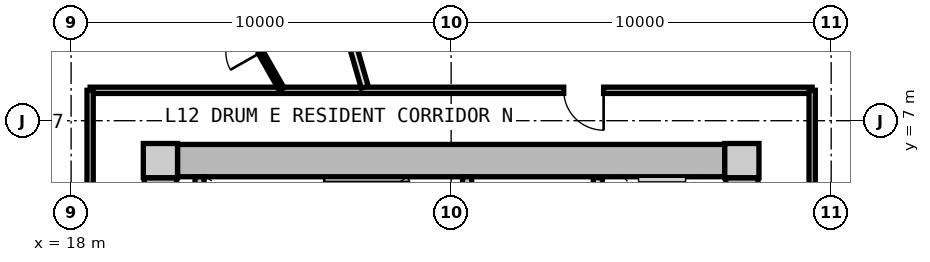
"""IFC4 building model, lengths in metres.
Left out: names, types, materials, properties, quantities, classifications, styles, units other than length and angle.
Written with IfcOpenShell. Run it as: python <this file> out.ifc"""

import sys

from ifc_helpers import new_model, si_unit, direction, frame, frame_2d, origin, origin_2d, place, context, subcontext, project, spatial, rectangle, extrude, source, transform, mapped, element, fill, save


model = new_model("IFC4")
c1 = context("Model", 3, precision=1e-05, world=origin(), true_north=direction((0.0, 1.0)))
c2 = subcontext(c1, "Body", "Model", "MODEL_VIEW")
j1 = project(units=[si_unit("LENGTHUNIT", "METRE"), si_unit("PLANEANGLEUNIT", "RADIAN")], contexts=[c1])
p1 = place(None, origin())
s1 = spatial("IfcSite", under=j1, at=p1, CompositionType="ELEMENT")
p2 = place(p1, origin())
s2 = spatial("IfcBuilding", under=s1, at=p2, CompositionType="ELEMENT")
p3 = place(p2, frame((0.0, 0.0, 42.95)))
s3 = spatial("IfcBuildingStorey", under=s2, at=p3, CompositionType="ELEMENT", Elevation=42.95)
m1 = source(origin(), c2, "Body", "SweptSolid", [
    extrude(rectangle(XDim=0.9, YDim=0.9, at=origin_2d()), origin(), (0.0, 0.0, 1.0), 3.05),
])
for number, where, z_axis, x_axis in (
    (1, (35.65, 5.95, 0.0), (0.0, 0.0, 1.0), (1.0, 0.0, 0.0)),
    (2, (20.35, 5.95, 0.0), (0.0, 0.0, 1.0), (1.0, 0.0, 0.0)),
):
    element("IfcColumn", number, at=place(p3, frame(where, z_axis=z_axis, x_axis=x_axis)), inside=s3, PredefinedType="COLUMN", context=c2, shape_type="MappedRepresentation", body=[
        mapped(m1, transform((0.0, 0.0, 0.0), x_axis=(1.0, 0.0, 0.0), y_axis=(0.0, 1.0, 0.0), z_axis=(0.0, 0.0, 1.0), scale=1.0)),
    ])
m2 = source(origin(), c2, "Body", "SweptSolid", [
    extrude(rectangle(XDim=14.4, YDim=0.85, at=frame_2d((7.2, 0.0))), origin(), (0.0, 0.0, 1.0), 2.79),
])
p4 = place(p3, frame((20.8, 5.95, 0.0), z_axis=(0.0, 0.0, 1.0), x_axis=(1.0, 0.0, 0.0)))
e3 = element("IfcWall", 3, at=p4, inside=s3, PredefinedType="SHEAR", context=c2, shape_type="MappedRepresentation", body=[
    mapped(m2, transform((0.0, 0.0, 0.0), x_axis=(1.0, 0.0, 0.0), y_axis=(0.0, 1.0, 0.0), z_axis=(0.0, 0.0, 1.0), scale=1.0)),
])
m3 = source(origin(), c2, "Body", "SweptSolid", [
    extrude(rectangle(XDim=11.0, YDim=0.85, at=frame_2d((5.5, 0.0))), origin(), (0.0, 0.0, 1.0), 2.79),
])
p5 = place(p3, frame((20.35, -5.5, 0.0), z_axis=(0.0, 0.0, 1.0), x_axis=(0.0, 1.0, 0.0)))
e4 = element("IfcWall", 4, at=p5, inside=s3, PredefinedType="SHEAR", context=c2, shape_type="MappedRepresentation", body=[
    mapped(m3, transform((0.0, 0.0, 0.0), x_axis=(1.0, 0.0, 0.0), y_axis=(0.0, 1.0, 0.0), z_axis=(0.0, 0.0, 1.0), scale=1.0)),
])
p6 = place(p5, frame((3.8, 0.0, 0.0)))
e5 = element("IfcOpeningElement", 5, at=p6, cuts=e4, PredefinedType="OPENING", context=c2, shape_type="SweptSolid", body=[
    extrude(rectangle(XDim=1.2, YDim=2.15, at=frame_2d((0.6, 1.075))), frame((0.0, 0.435, 0.0), z_axis=(0.0, -1.0, 0.0), x_axis=(1.0, 0.0, 0.0)), (0.0, 0.0, 1.0), 0.87),
])
p7 = place(p3, frame((35.65, 5.5, 0.0), z_axis=(0.0, 0.0, 1.0), x_axis=(0.0, -1.0, 0.0)))
e6 = element("IfcWall", 6, at=p7, inside=s3, PredefinedType="SHEAR", context=c2, shape_type="MappedRepresentation", body=[
    mapped(m3, transform((0.0, 0.0, 0.0), x_axis=(1.0, 0.0, 0.0), y_axis=(0.0, 1.0, 0.0), z_axis=(0.0, 0.0, 1.0), scale=1.0)),
])
p8 = place(p7, frame((5.65, 0.0, 0.0)))
e7 = element("IfcOpeningElement", 7, at=p8, cuts=e6, PredefinedType="OPENING", context=c2, shape_type="SweptSolid", body=[
    extrude(rectangle(XDim=1.2, YDim=2.15, at=frame_2d((0.6, 1.075))), frame((0.0, 0.435, 0.0), z_axis=(0.0, -1.0, 0.0), x_axis=(1.0, 0.0, 0.0)), (0.0, 0.0, 1.0), 0.87),
])
m4 = source(origin(), c2, "Body", "SweptSolid", [
    extrude(rectangle(XDim=3.075, YDim=0.24, at=frame_2d((1.538, 0.0))), origin(), (0.0, 0.0, 1.0), 2.79),
])
p9 = place(p3, frame((21.38, 2.45, 0.0), z_axis=(0.0, 0.0, 1.0), x_axis=(0.0, 1.0, 0.0)))
e8 = element("IfcWall", 8, at=p9, inside=s3, PredefinedType="PARTITIONING", context=c2, shape_type="MappedRepresentation", body=[
    mapped(m4, transform((0.0, 0.0, 0.0), x_axis=(1.0, 0.0, 0.0), y_axis=(0.0, 1.0, 0.0), z_axis=(0.0, 0.0, 1.0), scale=1.0)),
])
p10 = place(p3, frame((28.42, 2.45, 0.0), z_axis=(0.0, 0.0, 1.0), x_axis=(0.0, 1.0, 0.0)))
e9 = element("IfcWall", 9, at=p10, inside=s3, PredefinedType="PARTITIONING", context=c2, shape_type="MappedRepresentation", body=[
    mapped(m4, transform((0.0, 0.0, 0.0), x_axis=(1.0, 0.0, 0.0), y_axis=(0.0, 1.0, 0.0), z_axis=(0.0, 0.0, 1.0), scale=1.0)),
])
p11 = place(p10, frame((0.55, 0.0, 0.0)))
e10 = element("IfcOpeningElement", 10, at=p11, cuts=e9, PredefinedType="OPENING", context=c2, shape_type="SweptSolid", body=[
    extrude(rectangle(XDim=1.1, YDim=2.15, at=frame_2d((0.55, 1.075))), frame((0.0, 0.13, 0.0), z_axis=(0.0, -1.0, 0.0), x_axis=(1.0, 0.0, 0.0)), (0.0, 0.0, 1.0), 0.26),
])
m5 = source(origin(), c2, "Body", "SweptSolid", [
    extrude(rectangle(XDim=5.0, YDim=0.24, at=frame_2d((2.5, 0.0))), origin(), (0.0, 0.0, 1.0), 2.775),
])
p12 = place(p3, frame((31.86, 0.5, 0.0), z_axis=(0.0, 0.0, 1.0), x_axis=(0.0, 1.0, 0.0)))
e11 = element("IfcWall", 11, at=p12, inside=s3, PredefinedType="PARTITIONING", context=c2, shape_type="MappedRepresentation", body=[
    mapped(m5, transform((0.0, 0.0, 0.0), x_axis=(1.0, 0.0, 0.0), y_axis=(0.0, 1.0, 0.0), z_axis=(0.0, 0.0, 1.0), scale=1.0)),
])
p13 = place(p12, frame((3.05, 0.0, 0.0)))
e12 = element("IfcOpeningElement", 12, at=p13, cuts=e11, PredefinedType="OPENING", context=c2, shape_type="SweptSolid", body=[
    extrude(rectangle(XDim=1.3, YDim=2.2, at=frame_2d((0.65, 1.1))), frame((0.0, 0.13, 0.0), z_axis=(0.0, -1.0, 0.0), x_axis=(1.0, 0.0, 0.0)), (0.0, 0.0, 1.0), 0.26),
])
p14 = place(p12, frame((0.55, 0.0, 0.0)))
e13 = element("IfcOpeningElement", 13, at=p14, cuts=e11, PredefinedType="OPENING", context=c2, shape_type="SweptSolid", body=[
    extrude(rectangle(XDim=1.3, YDim=2.2, at=frame_2d((0.65, 1.1))), frame((0.0, 0.13, 0.0), z_axis=(0.0, -1.0, 0.0), x_axis=(1.0, 0.0, 0.0)), (0.0, 0.0, 1.0), 0.26),
])
m6 = source(origin(), c2, "Body", "SweptSolid", [
    extrude(rectangle(XDim=19.0, YDim=0.165, at=frame_2d((9.5, 0.0))), origin(), (0.0, 0.0, 1.0), 2.775),
])
p15 = place(p3, frame((18.5, 7.8, 0.0), z_axis=(0.0, 0.0, 1.0), x_axis=(1.0, 0.0, 0.0)))
e14 = element("IfcWall", 14, at=p15, inside=s3, PredefinedType="PARTITIONING", context=c2, shape_type="MappedRepresentation", body=[
    mapped(m6, transform((0.0, 0.0, 0.0), x_axis=(1.0, 0.0, 0.0), y_axis=(0.0, 1.0, 0.0), z_axis=(0.0, 0.0, 1.0), scale=1.0)),
])
p16 = place(p15, frame((12.462, 0.0, 0.0)))
e15 = element("IfcOpeningElement", 15, at=p16, cuts=e14, PredefinedType="OPENING", context=c2, shape_type="SweptSolid", body=[
    extrude(rectangle(XDim=1.05, YDim=2.15, at=frame_2d((0.525, 1.075))), frame((0.0, 0.093, 0.0), z_axis=(0.0, -1.0, 0.0), x_axis=(1.0, 0.0, 0.0)), (0.0, 0.0, 1.0), 0.185),
])
m7 = source(origin(), c2, "Body", "SweptSolid", [
    extrude(rectangle(XDim=15.6, YDim=0.165, at=frame_2d((7.8, 0.0))), origin(), (0.0, 0.0, 1.0), 2.775),
])
p17 = place(p3, frame((18.5, -7.8, 0.0), z_axis=(0.0, 0.0, 1.0), x_axis=(0.0, 1.0, 0.0)))
e16 = element("IfcWall", 16, at=p17, inside=s3, PredefinedType="PARTITIONING", context=c2, shape_type="MappedRepresentation", body=[
    mapped(m7, transform((0.0, 0.0, 0.0), x_axis=(1.0, 0.0, 0.0), y_axis=(0.0, 1.0, 0.0), z_axis=(0.0, 0.0, 1.0), scale=1.0)),
])
p18 = place(p17, frame((7.275, 0.0, 0.0)))
e17 = element("IfcOpeningElement", 17, at=p18, cuts=e16, PredefinedType="OPENING", context=c2, shape_type="SweptSolid", body=[
    extrude(rectangle(XDim=1.05, YDim=2.15, at=frame_2d((0.525, 1.075))), frame((0.0, 0.093, 0.0), z_axis=(0.0, -1.0, 0.0), x_axis=(1.0, 0.0, 0.0)), (0.0, 0.0, 1.0), 0.185),
])
p19 = place(p3, frame((37.5, 7.8, 0.0), z_axis=(0.0, 0.0, 1.0), x_axis=(0.0, -1.0, 0.0)))
e18 = element("IfcWall", 18, at=p19, inside=s3, PredefinedType="PARTITIONING", context=c2, shape_type="MappedRepresentation", body=[
    mapped(m7, transform((0.0, 0.0, 0.0), x_axis=(1.0, 0.0, 0.0), y_axis=(0.0, 1.0, 0.0), z_axis=(0.0, 0.0, 1.0), scale=1.0)),
])
p20 = place(p19, frame((14.215, 0.0, 0.0)))
e19 = element("IfcOpeningElement", 19, at=p20, cuts=e18, PredefinedType="OPENING", context=c2, shape_type="SweptSolid", body=[
    extrude(rectangle(XDim=0.92, YDim=2.1, at=frame_2d((0.46, 1.05))), frame((0.0, 0.093, 0.0), z_axis=(0.0, -1.0, 0.0), x_axis=(1.0, 0.0, 0.0)), (0.0, 0.0, 1.0), 0.185),
])
p21 = place(p19, frame((11.609, 0.0, 0.0)))
e20 = element("IfcOpeningElement", 20, at=p21, cuts=e18, PredefinedType="OPENING", context=c2, shape_type="SweptSolid", body=[
    extrude(rectangle(XDim=0.92, YDim=2.1, at=frame_2d((0.46, 1.05))), frame((0.0, 0.093, 0.0), z_axis=(0.0, -1.0, 0.0), x_axis=(1.0, 0.0, 0.0)), (0.0, 0.0, 1.0), 0.185),
])
p22 = place(p19, frame((7.175, 0.0, 0.0)))
e21 = element("IfcOpeningElement", 21, at=p22, cuts=e18, PredefinedType="OPENING", context=c2, shape_type="SweptSolid", body=[
    extrude(rectangle(XDim=1.25, YDim=2.2, at=frame_2d((0.625, 1.1))), frame((0.0, 0.093, 0.0), z_axis=(0.0, -1.0, 0.0), x_axis=(1.0, 0.0, 0.0)), (0.0, 0.0, 1.0), 0.185),
])
m8 = source(origin(), c2, "Body", "SweptSolid", [
    extrude(rectangle(XDim=10.196, YDim=0.19, at=frame_2d((5.098, 0.0))), origin(), (0.0, 0.0, 1.0), 2.225),
])
p23 = place(p3, frame((25.727, 7.88, 0.0), z_axis=(0.0, 0.0, 1.0), x_axis=(-0.277136420347, 0.960830580549, 0.0)))
e22 = element("IfcWall", 22, at=p23, inside=s3, PredefinedType="PARTITIONING", context=c2, shape_type="MappedRepresentation", body=[
    mapped(m8, transform((0.0, 0.0, 0.0), x_axis=(1.0, 0.0, 0.0), y_axis=(0.0, 1.0, 0.0), z_axis=(0.0, 0.0, 1.0), scale=1.0)),
])
m9 = source(origin(), c2, "Body", "SweptSolid", [
    extrude(rectangle(XDim=3.141, YDim=0.14, at=frame_2d((1.571, 0.0))), origin(), (0.0, 0.0, 1.0), 2.775),
])
p24 = place(p3, frame((23.542, 7.83, 0.0), z_axis=(0.0, 0.0, 1.0), x_axis=(-0.494874486088, 0.868964465913, 0.0)))
e23 = element("IfcWall", 23, at=p24, inside=s3, PredefinedType="PARTITIONING", context=c2, shape_type="MappedRepresentation", body=[
    mapped(m9, transform((0.0, 0.0, 0.0), x_axis=(1.0, 0.0, 0.0), y_axis=(0.0, 1.0, 0.0), z_axis=(0.0, 0.0, 1.0), scale=1.0)),
])
p25 = place(p24, frame((1.111, 0.0, 0.0)))
e24 = element("IfcOpeningElement", 24, at=p25, cuts=e23, PredefinedType="OPENING", context=c2, shape_type="SweptSolid", body=[
    extrude(rectangle(XDim=0.92, YDim=2.1, at=frame_2d((0.46, 1.05))), frame((0.0, 0.08, 0.0), z_axis=(0.0, -1.0, 0.0), x_axis=(1.0, 0.0, 0.0)), (0.0, 0.0, 1.0), 0.16),
])
m10 = source(origin(), c2, "Body", "SweptSolid", [
    extrude(rectangle(XDim=2.834, YDim=0.14, at=frame_2d((1.417, 0.0))), origin(), (0.0, 0.0, 1.0), 2.775),
])
p26 = place(p3, frame((37.53, 4.732, 0.0), z_axis=(0.0, 0.0, 1.0), x_axis=(0.895681174462, 0.444696788513, 0.0)))
e25 = element("IfcWall", 25, at=p26, inside=s3, PredefinedType="PARTITIONING", context=c2, shape_type="MappedRepresentation", body=[
    mapped(m10, transform((0.0, 0.0, 0.0), x_axis=(1.0, 0.0, 0.0), y_axis=(0.0, 1.0, 0.0), z_axis=(0.0, 0.0, 1.0), scale=1.0)),
])
m11 = source(origin(), c2, "Body", "SweptSolid", [
    extrude(rectangle(XDim=0.92, YDim=2.1, at=frame_2d((0.46, 1.05))), frame((0.0, 0.025, 0.0), z_axis=(0.0, -1.0, 0.0), x_axis=(1.0, 0.0, 0.0)), (0.0, 0.0, 1.0), 0.05),
])
p27 = place(p25, origin())
e26 = element("IfcDoor", 26, at=p27, inside=s3, OperationType="SINGLE_SWING_LEFT", PredefinedType="DOOR", context=c2, shape_type="MappedRepresentation", body=[
    mapped(m11, transform((0.0, 0.0, 0.0), x_axis=(1.0, 0.0, 0.0), y_axis=(0.0, 1.0, 0.0), z_axis=(0.0, 0.0, 1.0), scale=1.0)),
])
fill(e24, e26)
m12 = source(origin(), c2, "Body", "SweptSolid", [
    extrude(rectangle(XDim=1.05, YDim=2.15, at=frame_2d((0.525, 1.075))), frame((0.0, 0.025, 0.0), z_axis=(0.0, -1.0, 0.0), x_axis=(1.0, 0.0, 0.0)), (0.0, 0.0, 1.0), 0.05),
])
p28 = place(p16, frame((1.05, 0.0, 0.0), z_axis=(0.0, 0.0, 1.0), x_axis=(-1.0, 0.0, 0.0)))
e27 = element("IfcDoor", 27, at=p28, inside=s3, OperationType="SINGLE_SWING_LEFT", PredefinedType="DOOR", context=c2, shape_type="MappedRepresentation", body=[
    mapped(m12, transform((0.0, 0.0, 0.0), x_axis=(1.0, 0.0, 0.0), y_axis=(0.0, 1.0, 0.0), z_axis=(0.0, 0.0, 1.0), scale=1.0)),
])
fill(e15, e27)
save(model, sys.argv[1])
